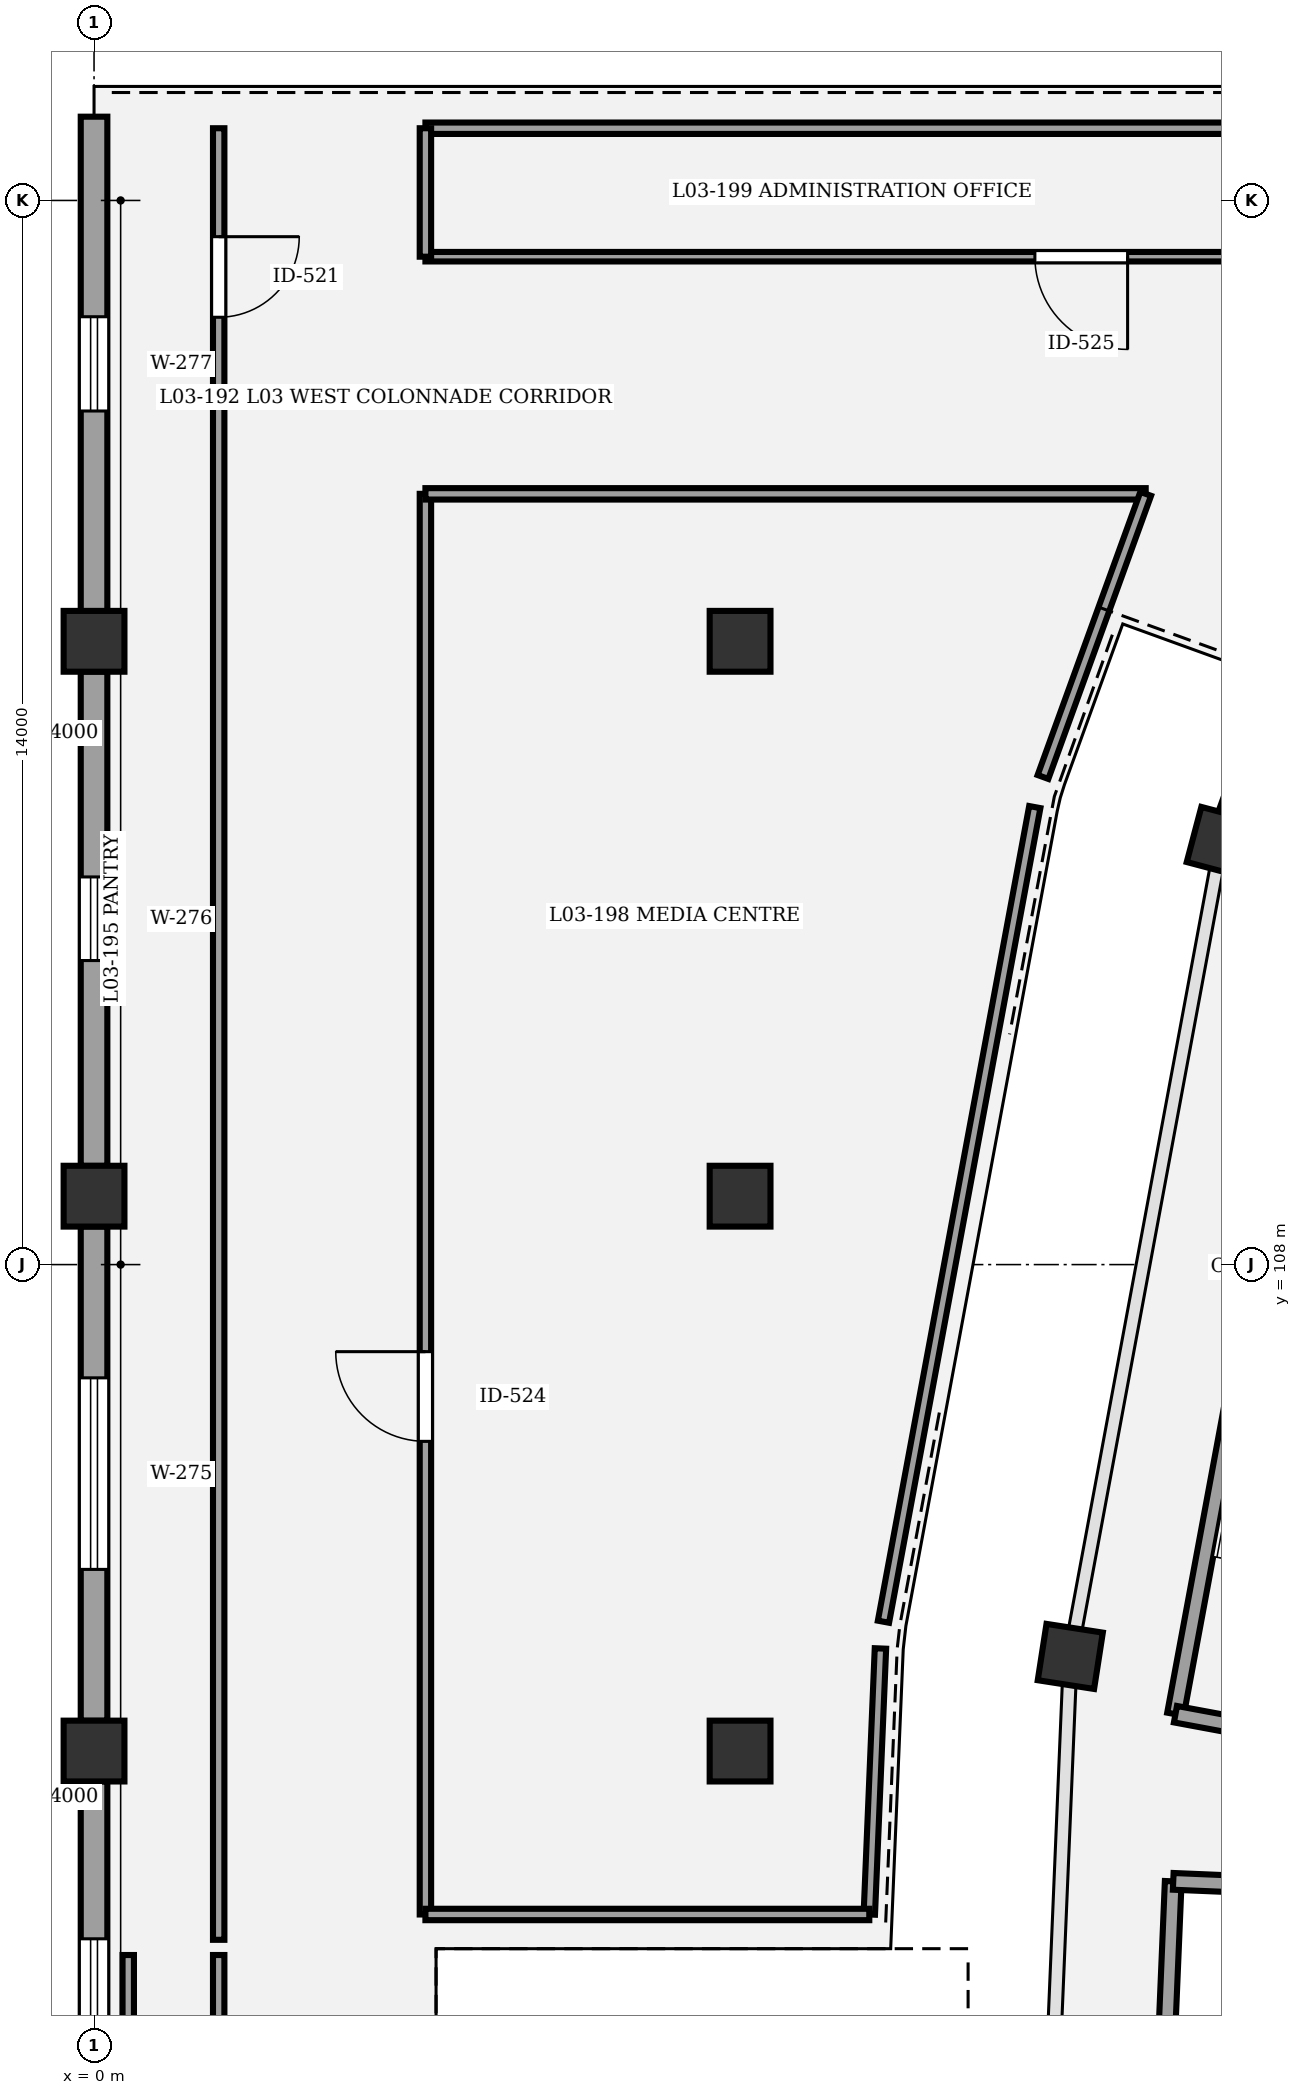
"""IFC4 building model, lengths in metres.
Left out: names, types, materials, properties, quantities, classifications, styles, units other than length and angle.
Written with IfcOpenShell. Run it as: python <this file> out.ifc"""

import sys

from ifc_helpers import new_model, si_unit, direction, frame, frame_2d, origin, origin_2d, place, context, subcontext, project, spatial, rectangle, circle, extrude, element, fill, save


model = new_model("IFC4")
c1 = context("Model", 3, precision=1e-05, world=origin(), true_north=direction((0.0, 1.0)))
c2 = subcontext(c1, "Body", "Model", "MODEL_VIEW")
j1 = project(units=[si_unit("LENGTHUNIT", "METRE"), si_unit("PLANEANGLEUNIT", "RADIAN")], contexts=[c1])
p1 = place(None, origin())
s1 = spatial("IfcSite", under=j1, at=p1, CompositionType="ELEMENT")
p2 = place(p1, origin())
s2 = spatial("IfcBuilding", under=s1, at=p2, CompositionType="ELEMENT")
p3 = place(p2, frame((0.0, 0.0, 14.7)))
s3 = spatial("IfcBuildingStorey", under=s2, at=p3, CompositionType="ELEMENT", Elevation=14.7)
for number, where, z_axis, x_axis in (
    (1, (14.835, 113.562, 0.0), (0.0, 0.0, 1.0), (-0.967, 0.256, 0.0)),
    (2, (12.844, 102.845, 0.0), (0.0, 0.0, 1.0), (-0.988, 0.153, 0.0)),
):
    element("IfcColumn", number, at=place(p3, frame(where, z_axis=z_axis, x_axis=x_axis)), inside=s3, PredefinedType="COLUMN", context=c2, shape_type="SweptSolid", body=[
        extrude(rectangle(XDim=0.75, YDim=0.75, at=origin_2d()), origin(), (0.0, 0.0, 1.0), 4.5),
    ])
for number, where, z_axis, x_axis in (
    (3, (0.0, 101.6, 0.0), (0.0, 0.0, 1.0), (1.0, 0.0, 0.0)),
    (4, (0.0, 108.9, 0.0), (0.0, 0.0, 1.0), (1.0, 0.0, 0.0)),
    (5, (0.0, 116.2, 0.0), (0.0, 0.0, 1.0), (1.0, 0.0, 0.0)),
    (6, (8.5, 101.6, 0.0), (0.0, 0.0, 1.0), (1.0, 0.0, 0.0)),
    (7, (8.5, 108.9, 0.0), (0.0, 0.0, 1.0), (1.0, 0.0, 0.0)),
    (8, (8.5, 116.2, 0.0), (0.0, 0.0, 1.0), (1.0, 0.0, 0.0)),
):
    element("IfcColumn", number, at=place(p3, frame(where, z_axis=z_axis, x_axis=x_axis)), inside=s3, PredefinedType="COLUMN", context=c2, shape_type="SweptSolid", body=[
        extrude(circle(Radius=0.4, at=origin_2d()), origin(), (0.0, 0.0, 1.0), 4.5),
    ])
p4 = place(p3, frame((14.963, 113.913, 0.0), z_axis=(0.0, 0.0, 1.0), x_axis=(0.341014063491, 0.94005819421, 0.0)))
e9 = element("IfcWall", 9, at=p4, inside=s3, PredefinedType="STANDARD", context=c2, shape_type="SweptSolid", body=[
    extrude(rectangle(XDim=8.956, YDim=0.35, at=frame_2d((4.478, 0.0))), origin(), (0.0, 0.0, 1.0), 3.42),
])
p5 = place(p4, frame((3.578, 0.0, 0.0)))
e10 = element("IfcOpeningElement", 10, at=p5, cuts=e9, PredefinedType="OPENING", context=c2, shape_type="SweptSolid", body=[
    extrude(rectangle(XDim=1.8, YDim=2.4, at=frame_2d((0.9, 1.2))), frame((0.0, 0.185, 0.0), z_axis=(0.0, -1.0, 0.0), x_axis=(1.0, 0.0, 0.0)), (0.0, 0.0, 1.0), 0.37),
])
p6 = place(p3, frame((0.0, 94.698, 0.0), z_axis=(0.0, 0.0, 1.0), x_axis=(0.0, 1.0, 0.0)))
e11 = element("IfcWall", 11, at=p6, inside=s3, PredefinedType="STANDARD", context=c2, shape_type="SweptSolid", body=[
    extrude(rectangle(XDim=6.504, YDim=0.35, at=frame_2d((3.252, 0.0))), origin(), (0.0, 0.0, 1.0), 3.26),
])
p7 = place(p6, frame((2.072, 0.0, 0.9)))
e12 = element("IfcOpeningElement", 12, at=p7, cuts=e11, PredefinedType="OPENING", context=c2, shape_type="SweptSolid", body=[
    extrude(rectangle(XDim=2.36, YDim=1.55, at=frame_2d((1.18, 0.775))), frame((0.0, 0.185, 0.0), z_axis=(0.0, -1.0, 0.0), x_axis=(1.0, 0.0, 0.0)), (0.0, 0.0, 1.0), 0.37),
])
p8 = place(p3, frame((0.0, 101.998, 0.0), z_axis=(0.0, 0.0, 1.0), x_axis=(0.0, 1.0, 0.0)))
e13 = element("IfcWall", 13, at=p8, inside=s3, PredefinedType="STANDARD", context=c2, shape_type="SweptSolid", body=[
    extrude(rectangle(XDim=6.504, YDim=0.35, at=frame_2d((3.252, 0.0))), origin(), (0.0, 0.0, 1.0), 3.26),
])
p9 = place(p8, frame((1.992, 0.0, 0.9)))
e14 = element("IfcOpeningElement", 14, at=p9, cuts=e13, PredefinedType="OPENING", context=c2, shape_type="SweptSolid", body=[
    extrude(rectangle(XDim=2.52, YDim=1.55, at=frame_2d((1.26, 0.775))), frame((0.0, 0.185, 0.0), z_axis=(0.0, -1.0, 0.0), x_axis=(1.0, 0.0, 0.0)), (0.0, 0.0, 1.0), 0.37),
])
p10 = place(p3, frame((0.0, 109.298, 0.0), z_axis=(0.0, 0.0, 1.0), x_axis=(0.0, 1.0, 0.0)))
e15 = element("IfcWall", 15, at=p10, inside=s3, PredefinedType="STANDARD", context=c2, shape_type="SweptSolid", body=[
    extrude(rectangle(XDim=6.504, YDim=0.35, at=frame_2d((3.252, 0.0))), origin(), (0.0, 0.0, 1.0), 3.26),
])
p11 = place(p10, frame((2.702, 0.0, 0.9)))
e16 = element("IfcOpeningElement", 16, at=p11, cuts=e15, PredefinedType="OPENING", context=c2, shape_type="SweptSolid", body=[
    extrude(rectangle(XDim=1.1, YDim=1.75, at=frame_2d((0.55, 0.875))), frame((0.0, 0.185, 0.0), z_axis=(0.0, -1.0, 0.0), x_axis=(1.0, 0.0, 0.0)), (0.0, 0.0, 1.0), 0.37),
])
p12 = place(p3, frame((0.0, 116.598, 0.0), z_axis=(0.0, 0.0, 1.0), x_axis=(0.0, 1.0, 0.0)))
e17 = element("IfcWall", 17, at=p12, inside=s3, PredefinedType="STANDARD", context=c2, shape_type="SweptSolid", body=[
    extrude(rectangle(XDim=6.504, YDim=0.35, at=frame_2d((3.252, 0.0))), origin(), (0.0, 0.0, 1.0), 3.26),
])
p13 = place(p12, frame((2.632, 0.0, 0.9)))
e18 = element("IfcOpeningElement", 18, at=p13, cuts=e17, PredefinedType="OPENING", context=c2, shape_type="SweptSolid", body=[
    extrude(rectangle(XDim=1.24, YDim=1.75, at=frame_2d((0.62, 0.875))), frame((0.0, 0.185, 0.0), z_axis=(0.0, -1.0, 0.0), x_axis=(1.0, 0.0, 0.0)), (0.0, 0.0, 1.0), 0.37),
])
p14 = place(p3, frame((14.228, 102.085, 0.0), z_axis=(0.0, 0.0, 1.0), x_axis=(0.182574755222, 0.983191974517, 0.0)))
e19 = element("IfcWall", 19, at=p14, inside=s3, PredefinedType="SHEAR", context=c2, shape_type="SweptSolid", body=[
    extrude(rectangle(XDim=11.02, YDim=0.22, at=frame_2d((5.51, 0.0))), origin(), (0.0, 0.0, 1.0), 4.25),
])
p15 = place(p3, frame((18.564, 101.28, 0.0), z_axis=(0.0, 0.0, 1.0), x_axis=(-0.983179789985, 0.182640358532, 0.0)))
e20 = element("IfcWall", 20, at=p15, inside=s3, PredefinedType="SHEAR", context=c2, shape_type="SweptSolid", body=[
    extrude(rectangle(XDim=4.41, YDim=0.22, at=frame_2d((2.205, 0.0))), origin(), (0.0, 0.0, 1.0), 4.25),
])
p16 = place(p3, frame((13.738, 88.875, 0.0), z_axis=(0.0, 0.0, 1.0), x_axis=(0.041871977473, 0.999122984173, 0.0)))
e21 = element("IfcWall", 21, at=p16, inside=s3, PredefinedType="SHEAR", context=c2, shape_type="SweptSolid", body=[
    extrude(rectangle(XDim=11.02, YDim=0.22, at=frame_2d((5.51, 0.0))), origin(), (0.0, 0.0, 1.0), 4.25),
])
p17 = place(p3, frame((18.605, 99.701, 0.0), z_axis=(0.0, 0.0, 1.0), x_axis=(-0.999123741114, 0.041853911912, 0.0)))
e22 = element("IfcWall", 22, at=p17, inside=s3, PredefinedType="SHEAR", context=c2, shape_type="SweptSolid", body=[
    extrude(rectangle(XDim=4.41, YDim=0.22, at=frame_2d((2.205, 0.0))), origin(), (0.0, 0.0, 1.0), 4.25),
])
p18 = place(p3, frame((1.64, 98.917, 0.0), z_axis=(0.0, 0.0, 1.0), x_axis=(0.0, -1.0, 0.0)))
e23 = element("IfcWall", 23, at=p18, inside=s3, PredefinedType="PARTITIONING", context=c2, shape_type="SweptSolid", body=[
    extrude(rectangle(XDim=23.833, YDim=0.15, at=frame_2d((11.917, 0.0))), origin(), (0.0, 0.0, 1.0), 3.25),
])
p19 = place(p18, frame((8.081, 0.0, 0.0)))
e24 = element("IfcOpeningElement", 24, at=p19, cuts=e23, PredefinedType="OPENING", context=c2, shape_type="SweptSolid", body=[
    extrude(rectangle(XDim=1.02, YDim=2.2, at=frame_2d((0.51, 1.1))), frame((0.0, 0.085, 0.0), z_axis=(0.0, -1.0, 0.0), x_axis=(1.0, 0.0, 0.0)), (0.0, 0.0, 1.0), 0.17),
])
p20 = place(p3, frame((1.64, 122.95, 0.0), z_axis=(0.0, 0.0, 1.0), x_axis=(0.0, -1.0, 0.0)))
e25 = element("IfcWall", 25, at=p20, inside=s3, PredefinedType="PARTITIONING", context=c2, shape_type="SweptSolid", body=[
    extrude(rectangle(XDim=23.833, YDim=0.15, at=frame_2d((11.917, 0.0))), origin(), (0.0, 0.0, 1.0), 3.25),
])
p21 = place(p20, frame((1.427, 0.0, 0.0)))
e26 = element("IfcOpeningElement", 26, at=p21, cuts=e25, PredefinedType="OPENING", context=c2, shape_type="SweptSolid", body=[
    extrude(rectangle(XDim=1.06, YDim=2.2, at=frame_2d((0.53, 1.1))), frame((0.0, 0.085, 0.0), z_axis=(0.0, -1.0, 0.0), x_axis=(1.0, 0.0, 0.0)), (0.0, 0.0, 1.0), 0.17),
])
p22 = place(p3, frame((4.36, 99.45, 0.0), z_axis=(0.0, 0.0, 1.0), x_axis=(0.0, 1.0, 0.0)))
e27 = element("IfcWall", 27, at=p22, inside=s3, PredefinedType="PARTITIONING", context=c2, shape_type="SweptSolid", body=[
    extrude(rectangle(XDim=18.69, YDim=0.15, at=frame_2d((9.345, 0.0))), origin(), (0.0, 0.0, 1.0), 3.25),
])
p23 = place(p22, frame((6.225, 0.0, 0.0)))
e28 = element("IfcOpeningElement", 28, at=p23, cuts=e27, PredefinedType="OPENING", context=c2, shape_type="SweptSolid", body=[
    extrude(rectangle(XDim=1.18, YDim=2.2, at=frame_2d((0.59, 1.1))), frame((0.0, 0.085, 0.0), z_axis=(0.0, -1.0, 0.0), x_axis=(1.0, 0.0, 0.0)), (0.0, 0.0, 1.0), 0.17),
])
p24 = place(p3, frame((14.969, 121.26, 0.0), z_axis=(0.0, 0.0, 1.0), x_axis=(-1.0, 0.0, 0.0)))
e29 = element("IfcWall", 29, at=p24, inside=s3, PredefinedType="PARTITIONING", context=c2, shape_type="SweptSolid", body=[
    extrude(rectangle(XDim=10.608, YDim=0.125, at=frame_2d((5.304, 0.0))), origin(), (0.0, 0.0, 1.0), 3.25),
])
p25 = place(p24, frame((1.37, 0.0, 0.0)))
e30 = element("IfcOpeningElement", 30, at=p25, cuts=e29, PredefinedType="OPENING", context=c2, shape_type="SweptSolid", body=[
    extrude(rectangle(XDim=1.22, YDim=2.2, at=frame_2d((0.61, 1.1))), frame((0.0, 0.073, 0.0), z_axis=(0.0, -1.0, 0.0), x_axis=(1.0, 0.0, 0.0)), (0.0, 0.0, 1.0), 0.145),
])
p26 = place(p3, frame((0.45, 75.083, 0.0), z_axis=(0.0, 0.0, 1.0), x_axis=(0.0, 1.0, 0.0)))
e31 = element("IfcWall", 31, at=p26, inside=s3, PredefinedType="PARTITIONING", context=c2, shape_type="SweptSolid", body=[
    extrude(rectangle(XDim=23.833, YDim=0.15, at=frame_2d((11.917, 0.0))), origin(), (0.0, 0.0, 1.0), 3.25),
])
p27 = place(p3, frame((12.377, 114.019, 0.0), z_axis=(0.0, 0.0, 1.0), x_axis=(-0.182620957058, -0.983183393901, 0.0)))
e32 = element("IfcWall", 32, at=p27, inside=s3, PredefinedType="PARTITIONING", context=c2, shape_type="SweptSolid", body=[
    extrude(rectangle(XDim=10.901, YDim=0.15, at=frame_2d((5.45, 0.0))), origin(), (0.0, 0.0, 1.0), 3.25),
])
p28 = place(p3, frame((10.347, 102.95, 0.0), z_axis=(0.0, 0.0, 1.0), x_axis=(-0.041888559174, -0.999122289117, 0.0)))
e33 = element("IfcWall", 33, at=p28, inside=s3, PredefinedType="PARTITIONING", context=c2, shape_type="SweptSolid", body=[
    extrude(rectangle(XDim=3.503, YDim=0.15, at=frame_2d((1.751, 0.0))), origin(), (0.0, 0.0, 1.0), 3.25),
])
p29 = place(p3, frame((10.2, 99.45, 0.0), z_axis=(0.0, 0.0, 1.0), x_axis=(-1.0, 0.0, 0.0)))
e34 = element("IfcWall", 34, at=p29, inside=s3, PredefinedType="PARTITIONING", context=c2, shape_type="SweptSolid", body=[
    extrude(rectangle(XDim=5.84, YDim=0.15, at=frame_2d((2.92, 0.0))), origin(), (0.0, 0.0, 1.0), 3.25),
])
p30 = place(p3, frame((4.36, 118.14, 0.0), z_axis=(0.0, 0.0, 1.0), x_axis=(1.0, 0.0, 0.0)))
e35 = element("IfcWall", 35, at=p30, inside=s3, PredefinedType="PARTITIONING", context=c2, shape_type="SweptSolid", body=[
    extrude(rectangle(XDim=9.477, YDim=0.15, at=frame_2d((4.738, 0.0))), origin(), (0.0, 0.0, 1.0), 3.25),
])
p31 = place(p3, frame((13.837, 118.14, 0.0), z_axis=(0.0, 0.0, 1.0), x_axis=(-0.341035525383, -0.94005040845, 0.0)))
e36 = element("IfcWall", 36, at=p31, inside=s3, PredefinedType="PARTITIONING", context=c2, shape_type="SweptSolid", body=[
    extrude(rectangle(XDim=3.962, YDim=0.15, at=frame_2d((1.981, 0.0))), origin(), (0.0, 0.0, 1.0), 3.25),
])
p32 = place(p3, frame((4.36, 122.95, 0.0), z_axis=(0.0, 0.0, 1.0), x_axis=(1.0, 0.0, 0.0)))
e37 = element("IfcWall", 37, at=p32, inside=s3, PredefinedType="PARTITIONING", context=c2, shape_type="SweptSolid", body=[
    extrude(rectangle(XDim=11.221, YDim=0.15, at=frame_2d((5.611, 0.0))), origin(), (0.0, 0.0, 1.0), 3.25),
])
p33 = place(p3, frame((4.36, 121.26, 0.0), z_axis=(0.0, 0.0, 1.0), x_axis=(0.0, 1.0, 0.0)))
e38 = element("IfcWall", 38, at=p33, inside=s3, PredefinedType="PARTITIONING", context=c2, shape_type="SweptSolid", body=[
    extrude(rectangle(XDim=1.69, YDim=0.15, at=frame_2d((0.845, 0.0))), origin(), (0.0, 0.0, 1.0), 3.25),
])
p34 = place(p7, origin())
e39 = element("IfcWindow", 39, at=p34, inside=s3, PartitioningType="SINGLE_PANEL", PredefinedType="WINDOW", context=c2, shape_type="SweptSolid", body=[
    extrude(rectangle(XDim=2.36, YDim=1.55, at=frame_2d((1.18, 0.775))), frame((0.0, 0.03, 0.0), z_axis=(0.0, -1.0, 0.0), x_axis=(1.0, 0.0, 0.0)), (0.0, 0.0, 1.0), 0.06),
])
fill(e12, e39)
p35 = place(p9, origin())
e40 = element("IfcWindow", 40, at=p35, inside=s3, PartitioningType="SINGLE_PANEL", PredefinedType="WINDOW", context=c2, shape_type="SweptSolid", body=[
    extrude(rectangle(XDim=2.52, YDim=1.55, at=frame_2d((1.26, 0.775))), frame((0.0, 0.03, 0.0), z_axis=(0.0, -1.0, 0.0), x_axis=(1.0, 0.0, 0.0)), (0.0, 0.0, 1.0), 0.06),
])
fill(e14, e40)
p36 = place(p11, origin())
e41 = element("IfcWindow", 41, at=p36, inside=s3, PartitioningType="SINGLE_PANEL", PredefinedType="WINDOW", context=c2, shape_type="SweptSolid", body=[
    extrude(rectangle(XDim=1.1, YDim=1.75, at=frame_2d((0.55, 0.875))), frame((0.0, 0.03, 0.0), z_axis=(0.0, -1.0, 0.0), x_axis=(1.0, 0.0, 0.0)), (0.0, 0.0, 1.0), 0.06),
])
fill(e16, e41)
p37 = place(p13, origin())
e42 = element("IfcWindow", 42, at=p37, inside=s3, PartitioningType="SINGLE_PANEL", PredefinedType="WINDOW", context=c2, shape_type="SweptSolid", body=[
    extrude(rectangle(XDim=1.24, YDim=1.75, at=frame_2d((0.62, 0.875))), frame((0.0, 0.03, 0.0), z_axis=(0.0, -1.0, 0.0), x_axis=(1.0, 0.0, 0.0)), (0.0, 0.0, 1.0), 0.06),
])
fill(e18, e42)
p38 = place(p21, origin())
e43 = element("IfcDoor", 43, at=p38, inside=s3, OperationType="SINGLE_SWING_LEFT", PredefinedType="DOOR", context=c2, shape_type="SweptSolid", body=[
    extrude(rectangle(XDim=1.06, YDim=2.2, at=frame_2d((0.53, 1.1))), frame((0.0, 0.025, 0.0), z_axis=(0.0, -1.0, 0.0), x_axis=(1.0, 0.0, 0.0)), (0.0, 0.0, 1.0), 0.05),
])
fill(e26, e43)
p39 = place(p23, origin())
e44 = element("IfcDoor", 44, at=p39, inside=s3, OperationType="SINGLE_SWING_RIGHT", PredefinedType="DOOR", context=c2, shape_type="SweptSolid", body=[
    extrude(rectangle(XDim=1.18, YDim=2.2, at=frame_2d((0.59, 1.1))), frame((0.0, 0.025, 0.0), z_axis=(0.0, -1.0, 0.0), x_axis=(1.0, 0.0, 0.0)), (0.0, 0.0, 1.0), 0.05),
])
fill(e28, e44)
p40 = place(p25, origin())
e45 = element("IfcDoor", 45, at=p40, inside=s3, OperationType="SINGLE_SWING_LEFT", PredefinedType="DOOR", context=c2, shape_type="SweptSolid", body=[
    extrude(rectangle(XDim=1.22, YDim=2.2, at=frame_2d((0.61, 1.1))), frame((0.0, 0.025, 0.0), z_axis=(0.0, -1.0, 0.0), x_axis=(1.0, 0.0, 0.0)), (0.0, 0.0, 1.0), 0.05),
])
fill(e30, e45)
save(model, sys.argv[1])
